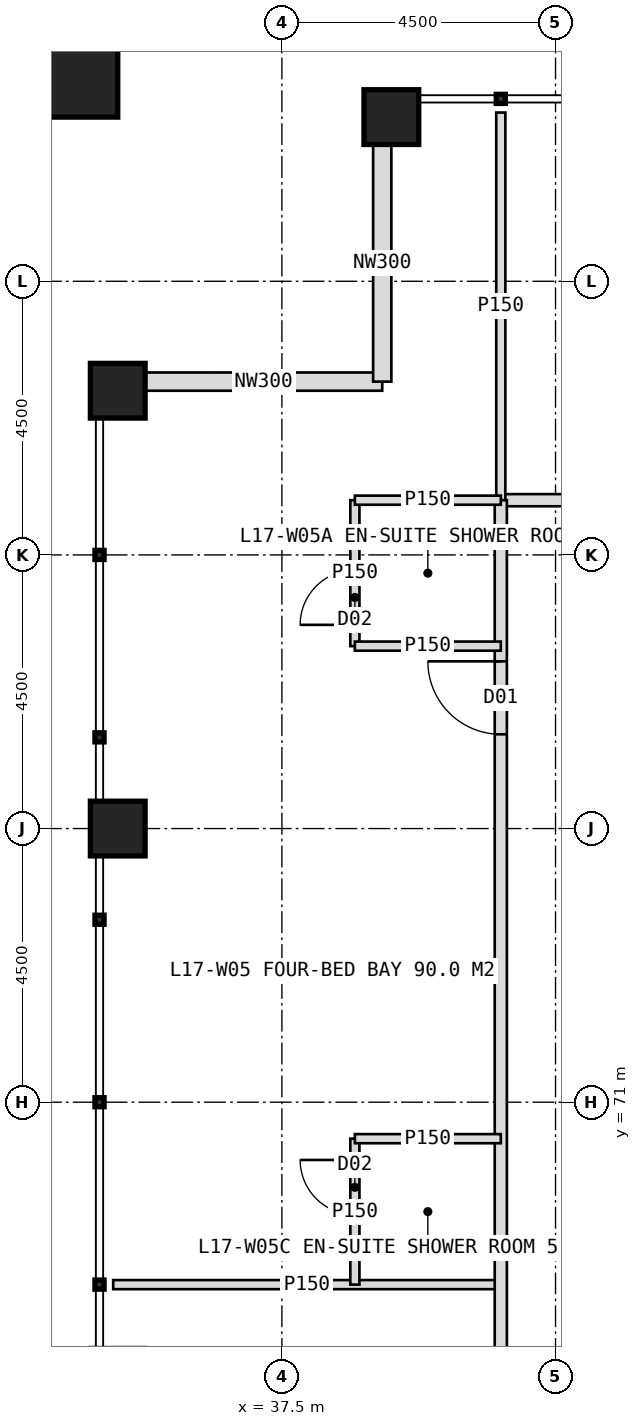
"""IFC4 building model, lengths in metres.
Left out: names, types, materials, properties, quantities, classifications, styles, units other than length and angle.
Written with IfcOpenShell. Run it as: python <this file> out.ifc"""

import sys

from ifc_helpers import new_model, si_unit, direction, frame, frame_2d, origin, origin_2d, place, context, subcontext, project, spatial, rectangle, hollow_rectangle, extrude, element, fill, save


model = new_model("IFC4")
c1 = context("Model", 3, precision=1e-05, world=origin(), true_north=direction((0.0, 1.0)))
c2 = subcontext(c1, "Body", "Model", "MODEL_VIEW")
j1 = project(units=[si_unit("LENGTHUNIT", "METRE"), si_unit("PLANEANGLEUNIT", "RADIAN")], contexts=[c1])
p1 = place(None, origin())
s1 = spatial("IfcSite", under=j1, at=p1, CompositionType="ELEMENT")
p2 = place(p1, origin())
s2 = spatial("IfcBuilding", under=s1, at=p2, CompositionType="ELEMENT")
p3 = place(p2, frame((0.0, 0.0, 75.0)))
s3 = spatial("IfcBuildingStorey", under=s2, at=p3, CompositionType="ELEMENT", Elevation=75.0)
for number, where, z_axis, x_axis in (
    (1, (39.3, 87.2, 0.0), (0.0, 0.0, 1.0), (1.0, 0.0, 0.0)),
    (2, (34.8, 75.5, 0.0), (0.0, 0.0, 1.0), (1.0, 0.0, 0.0)),
    (3, (34.8, 82.7, 0.0), (0.0, 0.0, 1.0), (1.0, 0.0, 0.0)),
):
    element("IfcColumn", number, at=place(p3, frame(where, z_axis=z_axis, x_axis=x_axis)), inside=s3, PredefinedType="COLUMN", context=c2, shape_type="SweptSolid", body=[
        extrude(hollow_rectangle(XDim=0.9, YDim=0.9, WallThickness=0.08, at=origin_2d()), origin(), (0.0, 0.0, 1.0), 4.0),
    ])
p4 = place(p3, frame((33.9, 88.1, 0.0), z_axis=(0.0, 0.0, 1.0), x_axis=(1.0, 0.0, 0.0)))
e4 = element("IfcColumn", 4, at=p4, inside=s3, PredefinedType="COLUMN", context=c2, shape_type="SweptSolid", body=[
    extrude(hollow_rectangle(XDim=1.8, YDim=1.8, WallThickness=0.1, at=origin_2d()), origin(), (0.0, 0.0, 1.0), 4.0),
])
for number, where, z_axis, x_axis in (
    (5, (35.25, 82.85, 0.0), (0.0, 0.0, 1.0), (1.0, 0.0, 0.0)),
    (6, (39.15, 82.85, 0.0), (0.0, 0.0, 1.0), (0.0, 1.0, 0.0)),
):
    element("IfcWall", number, at=place(p3, frame(where, z_axis=z_axis, x_axis=x_axis)), inside=s3, PredefinedType="ELEMENTEDWALL", context=c2, shape_type="SweptSolid", body=[
        extrude(rectangle(XDim=3.9, YDim=0.3, at=frame_2d((1.95, 0.0))), origin(), (0.0, 0.0, 1.0), 2.95),
    ])
p5 = place(p3, frame((41.1, 80.9, 0.0), z_axis=(0.0, 0.0, 1.0), x_axis=(1.0, 0.0, 0.0)))
e7 = element("IfcWall", 7, at=p5, inside=s3, PredefinedType="PARTITIONING", context=c2, shape_type="SweptSolid", body=[
    extrude(rectangle(XDim=37.8, YDim=0.2, at=frame_2d((18.9, 0.0))), origin(), (0.0, 0.0, 1.0), 3.75),
])
p6 = place(p5, frame((5.85, 0.0, 0.0)))
e8 = element("IfcOpeningElement", 8, at=p6, cuts=e7, PredefinedType="OPENING", context=c2, shape_type="SweptSolid", body=[
    extrude(rectangle(XDim=1.2, YDim=2.2, at=frame_2d((0.6, 1.1))), frame((0.0, 0.11, 0.0), z_axis=(0.0, -1.0, 0.0), x_axis=(1.0, 0.0, 0.0)), (0.0, 0.0, 1.0), 0.22),
])
p7 = place(p5, frame((18.3, 0.0, 0.0)))
e9 = element("IfcOpeningElement", 9, at=p7, cuts=e7, PredefinedType="OPENING", context=c2, shape_type="SweptSolid", body=[
    extrude(rectangle(XDim=1.2, YDim=2.2, at=frame_2d((0.6, 1.1))), frame((0.0, 0.11, 0.0), z_axis=(0.0, -1.0, 0.0), x_axis=(1.0, 0.0, 0.0)), (0.0, 0.0, 1.0), 0.22),
])
p8 = place(p5, frame((33.95, 0.0, 0.0)))
e10 = element("IfcOpeningElement", 10, at=p8, cuts=e7, PredefinedType="OPENING", context=c2, shape_type="SweptSolid", body=[
    extrude(rectangle(XDim=1.2, YDim=2.2, at=frame_2d((0.6, 1.1))), frame((0.0, 0.11, 0.0), z_axis=(0.0, -1.0, 0.0), x_axis=(1.0, 0.0, 0.0)), (0.0, 0.0, 1.0), 0.22),
])
for number, where, z_axis, x_axis in (
    (11, (41.1, 80.9, 0.0), (0.0, 0.0, 1.0), (0.0, 1.0, 0.0)),
    (12, (41.1, 68.0, 0.0), (0.0, 0.0, 1.0), (-1.0, 0.0, 0.0)),
):
    element("IfcWall", number, at=place(p3, frame(where, z_axis=z_axis, x_axis=x_axis)), inside=s3, PredefinedType="PARTITIONING", context=c2, shape_type="SweptSolid", body=[
        extrude(rectangle(XDim=6.375, YDim=0.15, at=frame_2d((3.188, 0.0))), origin(), (0.0, 0.0, 1.0), 3.75),
    ])
p9 = place(p3, frame((41.1, 43.1, 0.0), z_axis=(0.0, 0.0, 1.0), x_axis=(0.0, 1.0, 0.0)))
e13 = element("IfcWall", 13, at=p9, inside=s3, PredefinedType="PARTITIONING", context=c2, shape_type="SweptSolid", body=[
    extrude(rectangle(XDim=37.8, YDim=0.2, at=frame_2d((18.9, 0.0))), origin(), (0.0, 0.0, 1.0), 3.75),
])
p10 = place(p9, frame((2.45, 0.0, 0.0)))
e14 = element("IfcOpeningElement", 14, at=p10, cuts=e13, PredefinedType="OPENING", context=c2, shape_type="SweptSolid", body=[
    extrude(rectangle(XDim=1.2, YDim=2.2, at=frame_2d((0.6, 1.1))), frame((0.0, 0.11, 0.0), z_axis=(0.0, -1.0, 0.0), x_axis=(1.0, 0.0, 0.0)), (0.0, 0.0, 1.0), 0.22),
])
p11 = place(p9, frame((9.55, 0.0, 0.0)))
e15 = element("IfcOpeningElement", 15, at=p11, cuts=e13, PredefinedType="OPENING", context=c2, shape_type="SweptSolid", body=[
    extrude(rectangle(XDim=1.2, YDim=2.2, at=frame_2d((0.6, 1.1))), frame((0.0, 0.11, 0.0), z_axis=(0.0, -1.0, 0.0), x_axis=(1.0, 0.0, 0.0)), (0.0, 0.0, 1.0), 0.22),
])
p12 = place(p9, frame((15.05, 0.0, 0.0)))
e16 = element("IfcOpeningElement", 16, at=p12, cuts=e13, PredefinedType="OPENING", context=c2, shape_type="SweptSolid", body=[
    extrude(rectangle(XDim=1.2, YDim=2.2, at=frame_2d((0.6, 1.1))), frame((0.0, 0.11, 0.0), z_axis=(0.0, -1.0, 0.0), x_axis=(1.0, 0.0, 0.0)), (0.0, 0.0, 1.0), 0.22),
])
p13 = place(p9, frame((21.55, 0.0, 0.0)))
e17 = element("IfcOpeningElement", 17, at=p13, cuts=e13, PredefinedType="OPENING", context=c2, shape_type="SweptSolid", body=[
    extrude(rectangle(XDim=1.2, YDim=2.2, at=frame_2d((0.6, 1.1))), frame((0.0, 0.11, 0.0), z_axis=(0.0, -1.0, 0.0), x_axis=(1.0, 0.0, 0.0)), (0.0, 0.0, 1.0), 0.22),
])
p14 = place(p9, frame((33.95, 0.0, 0.0)))
e18 = element("IfcOpeningElement", 18, at=p14, cuts=e13, PredefinedType="OPENING", context=c2, shape_type="SweptSolid", body=[
    extrude(rectangle(XDim=1.2, YDim=2.2, at=frame_2d((0.6, 1.1))), frame((0.0, 0.11, 0.0), z_axis=(0.0, -1.0, 0.0), x_axis=(1.0, 0.0, 0.0)), (0.0, 0.0, 1.0), 0.22),
])
p15 = place(p3, frame((38.7, 78.5, 0.0), z_axis=(0.0, 0.0, 1.0), x_axis=(0.0, 1.0, 0.0)))
e19 = element("IfcWall", 19, at=p15, inside=s3, PredefinedType="PARTITIONING", context=c2, shape_type="SweptSolid", body=[
    extrude(rectangle(XDim=2.4, YDim=0.15, at=frame_2d((1.2, 0.0))), origin(), (0.0, 0.0, 1.0), 3.75),
])
p16 = place(p15, frame((0.35, 0.0, 0.0)))
e20 = element("IfcOpeningElement", 20, at=p16, cuts=e19, PredefinedType="OPENING", context=c2, shape_type="SweptSolid", body=[
    extrude(rectangle(XDim=0.9, YDim=2.1, at=frame_2d((0.45, 1.05))), frame((0.0, 0.085, 0.0), z_axis=(0.0, -1.0, 0.0), x_axis=(1.0, 0.0, 0.0)), (0.0, 0.0, 1.0), 0.17),
])
p17 = place(p3, frame((41.1, 78.5, 0.0), z_axis=(0.0, 0.0, 1.0), x_axis=(-1.0, 0.0, 0.0)))
e21 = element("IfcWall", 21, at=p17, inside=s3, PredefinedType="PARTITIONING", context=c2, shape_type="SweptSolid", body=[
    extrude(rectangle(XDim=2.4, YDim=0.15, at=frame_2d((1.2, 0.0))), origin(), (0.0, 0.0, 1.0), 3.75),
])
p18 = place(p3, frame((38.7, 68.0, 0.0), z_axis=(0.0, 0.0, 1.0), x_axis=(0.0, 1.0, 0.0)))
e22 = element("IfcWall", 22, at=p18, inside=s3, PredefinedType="PARTITIONING", context=c2, shape_type="SweptSolid", body=[
    extrude(rectangle(XDim=2.4, YDim=0.15, at=frame_2d((1.2, 0.0))), origin(), (0.0, 0.0, 1.0), 3.75),
])
p19 = place(p18, frame((1.15, 0.0, 0.0)))
e23 = element("IfcOpeningElement", 23, at=p19, cuts=e22, PredefinedType="OPENING", context=c2, shape_type="SweptSolid", body=[
    extrude(rectangle(XDim=0.9, YDim=2.1, at=frame_2d((0.45, 1.05))), frame((0.0, 0.085, 0.0), z_axis=(0.0, -1.0, 0.0), x_axis=(1.0, 0.0, 0.0)), (0.0, 0.0, 1.0), 0.17),
])
for number, where, z_axis, x_axis in (
    (24, (41.1, 70.4, 0.0), (0.0, 0.0, 1.0), (-1.0, 0.0, 0.0)),
    (25, (41.1, 80.9, 0.0), (0.0, 0.0, 1.0), (-1.0, 0.0, 0.0)),
):
    element("IfcWall", number, at=place(p3, frame(where, z_axis=z_axis, x_axis=x_axis)), inside=s3, PredefinedType="PARTITIONING", context=c2, shape_type="SweptSolid", body=[
        extrude(rectangle(XDim=2.4, YDim=0.15, at=frame_2d((1.2, 0.0))), origin(), (0.0, 0.0, 1.0), 3.75),
    ])
p20 = place(p14, origin())
e26 = element("IfcDoor", 26, at=p20, inside=s3, OperationType="SINGLE_SWING_RIGHT", PredefinedType="DOOR", context=c2, shape_type="SweptSolid", body=[
    extrude(rectangle(XDim=1.2, YDim=2.2, at=frame_2d((0.6, 1.1))), frame((0.0, 0.025, 0.0), z_axis=(0.0, -1.0, 0.0), x_axis=(1.0, 0.0, 0.0)), (0.0, 0.0, 1.0), 0.05),
])
fill(e18, e26)
p21 = place(p16, origin())
e27 = element("IfcDoor", 27, at=p21, inside=s3, OperationType="SINGLE_SWING_LEFT", PredefinedType="DOOR", context=c2, shape_type="SweptSolid", body=[
    extrude(rectangle(XDim=0.9, YDim=2.1, at=frame_2d((0.45, 1.05))), frame((0.0, 0.025, 0.0), z_axis=(0.0, -1.0, 0.0), x_axis=(1.0, 0.0, 0.0)), (0.0, 0.0, 1.0), 0.05),
])
fill(e20, e27)
p22 = place(p19, origin())
e28 = element("IfcDoor", 28, at=p22, inside=s3, OperationType="SINGLE_SWING_RIGHT", PredefinedType="DOOR", context=c2, shape_type="SweptSolid", body=[
    extrude(rectangle(XDim=0.9, YDim=2.1, at=frame_2d((0.45, 1.05))), frame((0.0, 0.025, 0.0), z_axis=(0.0, -1.0, 0.0), x_axis=(1.0, 0.0, 0.0)), (0.0, 0.0, 1.0), 0.05),
])
fill(e23, e28)
save(model, sys.argv[1])
